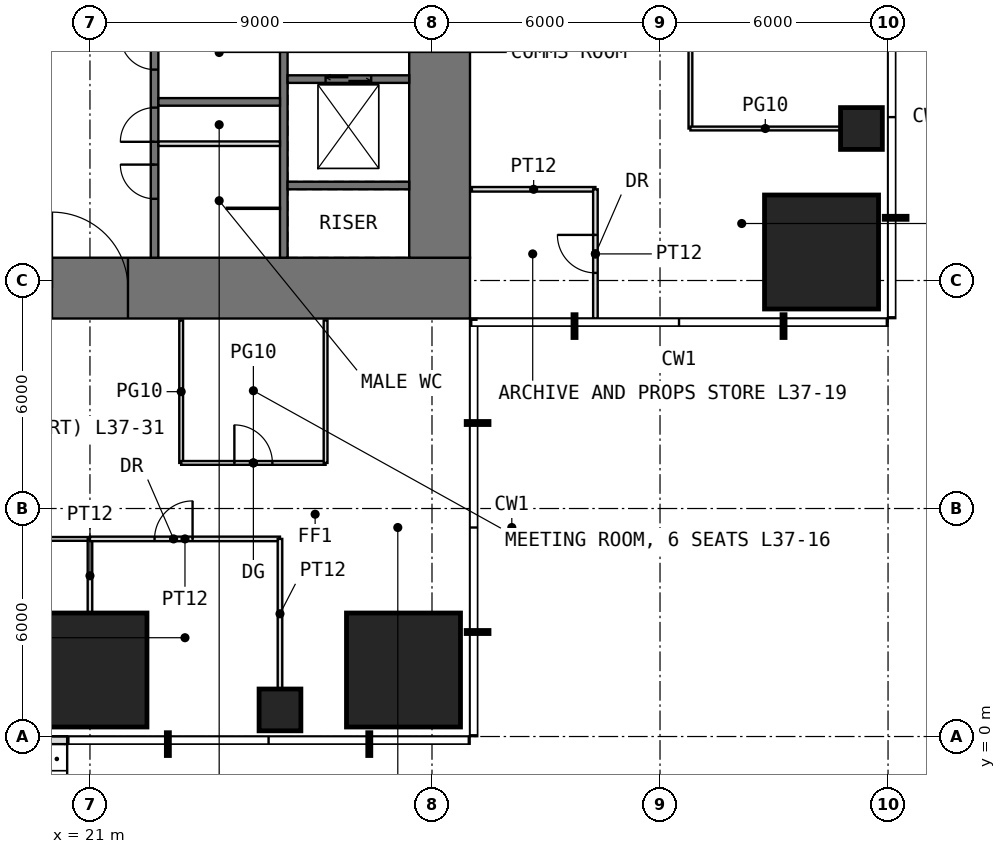
"""IFC4 building model, lengths in metres.
Left out: names, types, materials, properties, quantities, classifications, styles, units other than length and angle.
Written with IfcOpenShell. Run it as: python <this file> out.ifc"""

import sys

from ifc_helpers import new_model, si_unit, direction, frame, frame_2d, origin, origin_2d, place, context, subcontext, project, spatial, rectangle, extrude, element, fill, save


model = new_model("IFC4")
c1 = context("Model", 3, precision=1e-05, world=origin(), true_north=direction((0.0, 1.0)))
c2 = subcontext(c1, "Body", "Model", "MODEL_VIEW")
j1 = project(units=[si_unit("LENGTHUNIT", "METRE"), si_unit("PLANEANGLEUNIT", "RADIAN")], contexts=[c1])
p1 = place(None, origin())
s1 = spatial("IfcSite", under=j1, at=p1, CompositionType="ELEMENT")
p2 = place(p1, origin())
s2 = spatial("IfcBuilding", under=s1, at=p2, CompositionType="ELEMENT")
p3 = place(p2, frame((0.0, 0.0, 156.5)))
s3 = spatial("IfcBuildingStorey", under=s2, at=p3, CompositionType="ELEMENT", Elevation=156.5)
p4 = place(p3, frame((21.0, 1.75, 0.0), z_axis=(0.0, 0.0, 1.0), x_axis=(1.0, 0.0, 0.0)))
e1 = element("IfcColumn", 1, at=p4, inside=s3, PredefinedType="COLUMN", context=c2, shape_type="SweptSolid", body=[
    extrude(rectangle(XDim=3.0, YDim=3.0, at=origin_2d()), origin(), (0.0, 0.0, 1.0), 4.0),
])
p5 = place(p3, frame((26.0, 0.7, 0.0), z_axis=(0.0, 0.0, 1.0), x_axis=(1.0, 0.0, 0.0)))
e2 = element("IfcColumn", 2, at=p5, inside=s3, PredefinedType="COLUMN", context=c2, shape_type="SweptSolid", body=[
    extrude(rectangle(XDim=1.1, YDim=1.1, at=origin_2d()), origin(), (0.0, 0.0, 1.0), 4.0),
])
for number, where, z_axis, x_axis in (
    (3, (29.25, 1.75, 0.0), (0.0, 0.0, 1.0), (1.0, 0.0, 0.0)),
    (4, (40.25, 12.75, 0.0), (0.0, 0.0, 1.0), (1.0, 0.0, 0.0)),
):
    element("IfcColumn", number, at=place(p3, frame(where, z_axis=z_axis, x_axis=x_axis)), inside=s3, PredefinedType="COLUMN", context=c2, shape_type="SweptSolid", body=[
        extrude(rectangle(XDim=3.0, YDim=3.0, at=origin_2d()), origin(), (0.0, 0.0, 1.0), 4.0),
    ])
p6 = place(p3, frame((41.3, 16.0, 0.0), z_axis=(0.0, 0.0, 1.0), x_axis=(1.0, 0.0, 0.0)))
e5 = element("IfcColumn", 5, at=p6, inside=s3, PredefinedType="COLUMN", context=c2, shape_type="SweptSolid", body=[
    extrude(rectangle(XDim=1.1, YDim=1.1, at=origin_2d()), origin(), (0.0, 0.0, 1.0), 4.0),
])
p7 = place(p3, frame((16.6, -0.1, 0.0), z_axis=(0.0, 0.0, 1.0), x_axis=(1.0, 0.0, 0.0)))
e6 = element("IfcWall", 6, at=p7, inside=s3, PredefinedType="USERDEFINED", context=c2, shape_type="SweptSolid", body=[
    extrude(rectangle(XDim=3.8, YDim=0.2, at=frame_2d((1.9, 0.0))), origin(), (0.0, 0.0, 1.0), 3.55),
])
p8 = place(p7, frame((0.3, 0.0, 0.0)))
e7 = element("IfcOpeningElement", 7, at=p8, cuts=e6, PredefinedType="OPENING", context=c2, shape_type="SweptSolid", body=[
    extrude(rectangle(XDim=1.0, YDim=2.4, at=frame_2d((0.5, 1.2))), frame((0.0, 0.11, 0.0), z_axis=(0.0, -1.0, 0.0), x_axis=(1.0, 0.0, 0.0)), (0.0, 0.0, 1.0), 0.22),
])
p9 = place(p7, frame((1.6, 0.0, 0.3)))
e8 = element("IfcOpeningElement", 8, at=p9, cuts=e6, PredefinedType="OPENING", context=c2, shape_type="SweptSolid", body=[
    extrude(rectangle(XDim=1.4, YDim=2.7, at=frame_2d((0.7, 1.35))), frame((0.0, 0.11, 0.0), z_axis=(0.0, -1.0, 0.0), x_axis=(1.0, 0.0, 0.0)), (0.0, 0.0, 1.0), 0.22),
])
p10 = place(p3, frame((11.0, 11.8, -0.05), z_axis=(0.0, 0.0, 1.0), x_axis=(1.0, 0.0, 0.0)))
e9 = element("IfcWall", 9, at=p10, inside=s3, PredefinedType="SHEAR", context=c2, shape_type="SweptSolid", body=[
    extrude(rectangle(XDim=20.0, YDim=1.6, at=frame_2d((10.0, 0.0))), origin(), (0.0, 0.0, 1.0), 3.8),
])
p11 = place(p10, frame((9.0, 0.0, 0.05)))
e10 = element("IfcOpeningElement", 10, at=p11, cuts=e9, PredefinedType="OPENING", context=c2, shape_type="SweptSolid", body=[
    extrude(rectangle(XDim=2.0, YDim=2.2, at=frame_2d((1.0, 1.1))), frame((0.0, 0.81, 0.0), z_axis=(0.0, -1.0, 0.0), x_axis=(1.0, 0.0, 0.0)), (0.0, 0.0, 1.0), 1.62),
])
p12 = place(p3, frame((30.2, 12.6, -0.05), z_axis=(0.0, 0.0, 1.0), x_axis=(0.0, 1.0, 0.0)))
e11 = element("IfcWall", 11, at=p12, inside=s3, PredefinedType="SHEAR", context=c2, shape_type="SweptSolid", body=[
    extrude(rectangle(XDim=16.8, YDim=1.6, at=frame_2d((8.4, 0.0))), origin(), (0.0, 0.0, 1.0), 3.8),
])
p13 = place(p12, frame((5.9, 0.0, 0.05)))
e12 = element("IfcOpeningElement", 12, at=p13, cuts=e11, PredefinedType="OPENING", context=c2, shape_type="SweptSolid", body=[
    extrude(rectangle(XDim=1.0, YDim=2.2, at=frame_2d((0.5, 1.1))), frame((0.0, 0.81, 0.0), z_axis=(0.0, -1.0, 0.0), x_axis=(1.0, 0.0, 0.0)), (0.0, 0.0, 1.0), 1.62),
])
p14 = place(p3, frame((22.7, 12.6, -0.05), z_axis=(0.0, 0.0, 1.0), x_axis=(0.0, 1.0, 0.0)))
e13 = element("IfcWall", 13, at=p14, inside=s3, PredefinedType="SHEAR", context=c2, shape_type="SweptSolid", body=[
    extrude(rectangle(XDim=16.8, YDim=0.2, at=frame_2d((8.4, 0.0))), origin(), (0.0, 0.0, 1.0), 3.8),
])
p15 = place(p14, frame((3.05, 0.0, 0.05)))
e14 = element("IfcOpeningElement", 14, at=p15, cuts=e13, PredefinedType="OPENING", context=c2, shape_type="SweptSolid", body=[
    extrude(rectangle(XDim=0.9, YDim=2.2, at=frame_2d((0.45, 1.1))), frame((0.0, 0.11, 0.0), z_axis=(0.0, -1.0, 0.0), x_axis=(1.0, 0.0, 0.0)), (0.0, 0.0, 1.0), 0.22),
])
p16 = place(p14, frame((7.1, 0.0, 0.05)))
e15 = element("IfcOpeningElement", 15, at=p16, cuts=e13, PredefinedType="OPENING", context=c2, shape_type="SweptSolid", body=[
    extrude(rectangle(XDim=1.0, YDim=2.2, at=frame_2d((0.5, 1.1))), frame((0.0, 0.11, 0.0), z_axis=(0.0, -1.0, 0.0), x_axis=(1.0, 0.0, 0.0)), (0.0, 0.0, 1.0), 0.22),
])
p17 = place(p14, frame((1.55, 0.0, 0.05)))
e16 = element("IfcOpeningElement", 16, at=p17, cuts=e13, PredefinedType="OPENING", context=c2, shape_type="SweptSolid", body=[
    extrude(rectangle(XDim=0.9, YDim=2.2, at=frame_2d((0.45, 1.1))), frame((0.0, 0.11, 0.0), z_axis=(0.0, -1.0, 0.0), x_axis=(1.0, 0.0, 0.0)), (0.0, 0.0, 1.0), 0.22),
])
p18 = place(p14, frame((4.95, 0.0, 0.05)))
e17 = element("IfcOpeningElement", 17, at=p18, cuts=e13, PredefinedType="OPENING", context=c2, shape_type="SweptSolid", body=[
    extrude(rectangle(XDim=0.9, YDim=2.2, at=frame_2d((0.45, 1.1))), frame((0.0, 0.11, 0.0), z_axis=(0.0, -1.0, 0.0), x_axis=(1.0, 0.0, 0.0)), (0.0, 0.0, 1.0), 0.22),
])
p19 = place(p14, frame((9.4, 0.0, 0.05)))
e18 = element("IfcOpeningElement", 18, at=p19, cuts=e13, PredefinedType="OPENING", context=c2, shape_type="SweptSolid", body=[
    extrude(rectangle(XDim=1.0, YDim=2.2, at=frame_2d((0.5, 1.1))), frame((0.0, 0.11, 0.0), z_axis=(0.0, -1.0, 0.0), x_axis=(1.0, 0.0, 0.0)), (0.0, 0.0, 1.0), 0.22),
])
p20 = place(p3, frame((26.1, 12.6, -0.05), z_axis=(0.0, 0.0, 1.0), x_axis=(0.0, 1.0, 0.0)))
e19 = element("IfcWall", 19, at=p20, inside=s3, PredefinedType="SHEAR", context=c2, shape_type="SweptSolid", body=[
    extrude(rectangle(XDim=16.8, YDim=0.2, at=frame_2d((8.4, 0.0))), origin(), (0.0, 0.0, 1.0), 3.8),
])
p21 = place(p20, frame((6.9, 0.0, 0.05)))
e20 = element("IfcOpeningElement", 20, at=p21, cuts=e19, PredefinedType="OPENING", context=c2, shape_type="SweptSolid", body=[
    extrude(rectangle(XDim=1.0, YDim=2.2, at=frame_2d((0.5, 1.1))), frame((0.0, 0.11, 0.0), z_axis=(0.0, -1.0, 0.0), x_axis=(1.0, 0.0, 0.0)), (0.0, 0.0, 1.0), 0.22),
])
for number, where, z_axis, x_axis in (
    (21, (22.8, 16.7, -0.05), (0.0, 0.0, 1.0), (1.0, 0.0, 0.0)),
    (22, (26.2, 14.5, -0.05), (0.0, 0.0, 1.0), (1.0, 0.0, 0.0)),
):
    element("IfcWall", number, at=place(p3, frame(where, z_axis=z_axis, x_axis=x_axis)), inside=s3, PredefinedType="SHEAR", context=c2, shape_type="SweptSolid", body=[
        extrude(rectangle(XDim=3.2, YDim=0.2, at=frame_2d((1.6, 0.0))), origin(), (0.0, 0.0, 1.0), 3.8),
    ])
p22 = place(p3, frame((26.2, 17.3, -0.05), z_axis=(0.0, 0.0, 1.0), x_axis=(1.0, 0.0, 0.0)))
e23 = element("IfcWall", 23, at=p22, inside=s3, PredefinedType="SHEAR", context=c2, shape_type="SweptSolid", body=[
    extrude(rectangle(XDim=3.2, YDim=0.2, at=frame_2d((1.6, 0.0))), origin(), (0.0, 0.0, 1.0), 3.8),
])
p23 = place(p22, frame((1.0, 0.0, 0.05)))
e24 = element("IfcOpeningElement", 24, at=p23, cuts=e23, PredefinedType="OPENING", context=c2, shape_type="SweptSolid", body=[
    extrude(rectangle(XDim=1.2, YDim=2.2, at=frame_2d((0.6, 1.1))), frame((0.0, 0.11, 0.0), z_axis=(0.0, -1.0, 0.0), x_axis=(1.0, 0.0, 0.0)), (0.0, 0.0, 1.0), 0.22),
])
p24 = place(p3, frame((22.8, 15.6, 0.0), z_axis=(0.0, 0.0, 1.0), x_axis=(1.0, 0.0, 0.0)))
e25 = element("IfcWall", 25, at=p24, inside=s3, PredefinedType="PARTITIONING", context=c2, shape_type="SweptSolid", body=[
    extrude(rectangle(XDim=3.2, YDim=0.12, at=frame_2d((1.6, 0.0))), origin(), (0.0, 0.0, 1.0), 3.55),
])
p25 = place(p3, frame((24.6, 13.9, 0.0), z_axis=(0.0, 0.0, 1.0), x_axis=(1.0, 0.0, 0.0)))
e26 = element("IfcWall", 26, at=p25, inside=s3, PredefinedType="PARTITIONING", context=c2, shape_type="SweptSolid", body=[
    extrude(rectangle(XDim=1.4, YDim=0.03, at=frame_2d((0.7, 0.0))), origin(), (0.0, 0.0, 1.0), 3.55),
])
p26 = place(p3, frame((16.0, 5.2, 0.0), z_axis=(0.0, 0.0, 1.0), x_axis=(1.0, 0.0, 0.0)))
e27 = element("IfcWall", 27, at=p26, inside=s3, PredefinedType="PARTITIONING", context=c2, shape_type="SweptSolid", body=[
    extrude(rectangle(XDim=5.0, YDim=0.1, at=frame_2d((2.5, 0.0))), origin(), (0.0, 0.0, 1.0), 3.55),
])
p27 = place(p26, frame((2.0, 0.0, 0.0)))
e28 = element("IfcOpeningElement", 28, at=p27, cuts=e27, PredefinedType="OPENING", context=c2, shape_type="SweptSolid", body=[
    extrude(rectangle(XDim=1.0, YDim=2.4, at=frame_2d((0.5, 1.2))), frame((0.0, 0.06, 0.0), z_axis=(0.0, -1.0, 0.0), x_axis=(1.0, 0.0, 0.0)), (0.0, 0.0, 1.0), 0.12),
])
p28 = place(p3, frame((21.0, 3.26, 0.0), z_axis=(0.0, 0.0, 1.0), x_axis=(0.0, 1.0, 0.0)))
e29 = element("IfcWall", 29, at=p28, inside=s3, PredefinedType="PARTITIONING", context=c2, shape_type="SweptSolid", body=[
    extrude(rectangle(XDim=1.94, YDim=0.12, at=frame_2d((0.97, 0.0))), origin(), (0.0, 0.0, 1.0), 3.55),
])
p29 = place(p3, frame((21.0, 5.2, 0.0), z_axis=(0.0, 0.0, 1.0), x_axis=(1.0, 0.0, 0.0)))
e30 = element("IfcWall", 30, at=p29, inside=s3, PredefinedType="PARTITIONING", context=c2, shape_type="SweptSolid", body=[
    extrude(rectangle(XDim=5.0, YDim=0.12, at=frame_2d((2.5, 0.0))), origin(), (0.0, 0.0, 1.0), 3.55),
])
p30 = place(p29, frame((1.7, 0.0, 0.0)))
e31 = element("IfcOpeningElement", 31, at=p30, cuts=e30, PredefinedType="OPENING", context=c2, shape_type="SweptSolid", body=[
    extrude(rectangle(XDim=1.0, YDim=2.2, at=frame_2d((0.5, 1.1))), frame((0.0, 0.07, 0.0), z_axis=(0.0, -1.0, 0.0), x_axis=(1.0, 0.0, 0.0)), (0.0, 0.0, 1.0), 0.14),
])
p31 = place(p3, frame((23.4, 7.2, 0.0), z_axis=(0.0, 0.0, 1.0), x_axis=(0.0, 1.0, 0.0)))
e32 = element("IfcWall", 32, at=p31, inside=s3, PredefinedType="PARTITIONING", context=c2, shape_type="SweptSolid", body=[
    extrude(rectangle(XDim=3.75, YDim=0.1, at=frame_2d((1.875, 0.0))), origin(), (0.0, 0.0, 1.0), 3.55),
])
p32 = place(p3, frame((23.4, 7.2, 0.0), z_axis=(0.0, 0.0, 1.0), x_axis=(1.0, 0.0, 0.0)))
e33 = element("IfcWall", 33, at=p32, inside=s3, PredefinedType="PARTITIONING", context=c2, shape_type="SweptSolid", body=[
    extrude(rectangle(XDim=3.8, YDim=0.1, at=frame_2d((1.9, 0.0))), origin(), (0.0, 0.0, 1.0), 3.55),
])
p33 = place(p32, frame((1.4, 0.0, 0.0)))
e34 = element("IfcOpeningElement", 34, at=p33, cuts=e33, PredefinedType="OPENING", context=c2, shape_type="SweptSolid", body=[
    extrude(rectangle(XDim=1.0, YDim=2.4, at=frame_2d((0.5, 1.2))), frame((0.0, 0.06, 0.0), z_axis=(0.0, -1.0, 0.0), x_axis=(1.0, 0.0, 0.0)), (0.0, 0.0, 1.0), 0.12),
])
p34 = place(p3, frame((26.0, 1.26, 0.0), z_axis=(0.0, 0.0, 1.0), x_axis=(0.0, 1.0, 0.0)))
e35 = element("IfcWall", 35, at=p34, inside=s3, PredefinedType="PARTITIONING", context=c2, shape_type="SweptSolid", body=[
    extrude(rectangle(XDim=3.94, YDim=0.12, at=frame_2d((1.97, 0.0))), origin(), (0.0, 0.0, 1.0), 2.736),
])
p35 = place(p3, frame((27.2, 7.2, 0.0), z_axis=(0.0, 0.0, 1.0), x_axis=(0.0, 1.0, 0.0)))
e36 = element("IfcWall", 36, at=p35, inside=s3, PredefinedType="PARTITIONING", context=c2, shape_type="SweptSolid", body=[
    extrude(rectangle(XDim=3.75, YDim=0.1, at=frame_2d((1.875, 0.0))), origin(), (0.0, 0.0, 1.0), 3.55),
])
p36 = place(p3, frame((31.05, 14.4, 0.0), z_axis=(0.0, 0.0, 1.0), x_axis=(1.0, 0.0, 0.0)))
e37 = element("IfcWall", 37, at=p36, inside=s3, PredefinedType="PARTITIONING", context=c2, shape_type="SweptSolid", body=[
    extrude(rectangle(XDim=3.25, YDim=0.12, at=frame_2d((1.625, 0.0))), origin(), (0.0, 0.0, 1.0), 3.55),
])
p37 = place(p3, frame((34.3, 11.0, 0.0), z_axis=(0.0, 0.0, 1.0), x_axis=(0.0, 1.0, 0.0)))
e38 = element("IfcWall", 38, at=p37, inside=s3, PredefinedType="PARTITIONING", context=c2, shape_type="SweptSolid", body=[
    extrude(rectangle(XDim=3.4, YDim=0.12, at=frame_2d((1.7, 0.0))), origin(), (0.0, 0.0, 1.0), 3.55),
])
p38 = place(p37, frame((1.2, 0.0, 0.0)))
e39 = element("IfcOpeningElement", 39, at=p38, cuts=e38, PredefinedType="OPENING", context=c2, shape_type="SweptSolid", body=[
    extrude(rectangle(XDim=1.0, YDim=2.2, at=frame_2d((0.5, 1.1))), frame((0.0, 0.07, 0.0), z_axis=(0.0, -1.0, 0.0), x_axis=(1.0, 0.0, 0.0)), (0.0, 0.0, 1.0), 0.14),
])
p39 = place(p3, frame((36.8, 16.0, 0.0), z_axis=(0.0, 0.0, 1.0), x_axis=(0.0, 1.0, 0.0)))
e40 = element("IfcWall", 40, at=p39, inside=s3, PredefinedType="PARTITIONING", context=c2, shape_type="SweptSolid", body=[
    extrude(rectangle(XDim=10.0, YDim=0.1, at=frame_2d((5.0, 0.0))), origin(), (0.0, 0.0, 1.0), 3.55),
])
p40 = place(p39, frame((4.1, 0.0, 0.0)))
e41 = element("IfcOpeningElement", 41, at=p40, cuts=e40, PredefinedType="OPENING", context=c2, shape_type="SweptSolid", body=[
    extrude(rectangle(XDim=1.8, YDim=2.4, at=frame_2d((0.9, 1.2))), frame((0.0, 0.06, 0.0), z_axis=(0.0, -1.0, 0.0), x_axis=(1.0, 0.0, 0.0)), (0.0, 0.0, 1.0), 0.12),
])
p41 = place(p3, frame((36.8, 16.0, 0.0), z_axis=(0.0, 0.0, 1.0), x_axis=(1.0, 0.0, 0.0)))
e42 = element("IfcWall", 42, at=p41, inside=s3, PredefinedType="PARTITIONING", context=c2, shape_type="SweptSolid", body=[
    extrude(rectangle(XDim=3.94, YDim=0.1, at=frame_2d((1.97, 0.0))), origin(), (0.0, 0.0, 1.0), 2.736),
])
p42 = place(p11, origin())
e43 = element("IfcDoor", 43, at=p42, inside=s3, OperationType="DOUBLE_DOOR_SINGLE_SWING", PredefinedType="DOOR", context=c2, shape_type="SweptSolid", body=[
    extrude(rectangle(XDim=2.0, YDim=2.2, at=frame_2d((1.0, 1.1))), frame((0.0, 0.025, 0.0), z_axis=(0.0, -1.0, 0.0), x_axis=(1.0, 0.0, 0.0)), (0.0, 0.0, 1.0), 0.05),
])
fill(e10, e43)
p43 = place(p15, origin())
e44 = element("IfcDoor", 44, at=p43, inside=s3, OperationType="SINGLE_SWING_LEFT", PredefinedType="DOOR", context=c2, shape_type="SweptSolid", body=[
    extrude(rectangle(XDim=0.9, YDim=2.2, at=frame_2d((0.45, 1.1))), frame((0.0, 0.025, 0.0), z_axis=(0.0, -1.0, 0.0), x_axis=(1.0, 0.0, 0.0)), (0.0, 0.0, 1.0), 0.05),
])
fill(e14, e44)
p44 = place(p17, origin())
e45 = element("IfcDoor", 45, at=p44, inside=s3, OperationType="SINGLE_SWING_RIGHT", PredefinedType="DOOR", context=c2, shape_type="SweptSolid", body=[
    extrude(rectangle(XDim=0.9, YDim=2.2, at=frame_2d((0.45, 1.1))), frame((0.0, 0.025, 0.0), z_axis=(0.0, -1.0, 0.0), x_axis=(1.0, 0.0, 0.0)), (0.0, 0.0, 1.0), 0.05),
])
fill(e16, e45)
p45 = place(p18, origin())
e46 = element("IfcDoor", 46, at=p45, inside=s3, OperationType="SINGLE_SWING_RIGHT", PredefinedType="DOOR", context=c2, shape_type="SweptSolid", body=[
    extrude(rectangle(XDim=0.9, YDim=2.2, at=frame_2d((0.45, 1.1))), frame((0.0, 0.025, 0.0), z_axis=(0.0, -1.0, 0.0), x_axis=(1.0, 0.0, 0.0)), (0.0, 0.0, 1.0), 0.05),
])
fill(e17, e46)
p46 = place(p33, origin())
e47 = element("IfcDoor", 47, at=p46, inside=s3, OperationType="SINGLE_SWING_LEFT", PredefinedType="DOOR", context=c2, shape_type="SweptSolid", body=[
    extrude(rectangle(XDim=1.0, YDim=2.4, at=frame_2d((0.5, 1.2))), frame((0.0, 0.025, 0.0), z_axis=(0.0, -1.0, 0.0), x_axis=(1.0, 0.0, 0.0)), (0.0, 0.0, 1.0), 0.05),
])
fill(e34, e47)
p47 = place(p30, origin())
e48 = element("IfcDoor", 48, at=p47, inside=s3, OperationType="SINGLE_SWING_RIGHT", PredefinedType="DOOR", context=c2, shape_type="SweptSolid", body=[
    extrude(rectangle(XDim=1.0, YDim=2.2, at=frame_2d((0.5, 1.1))), frame((0.0, 0.025, 0.0), z_axis=(0.0, -1.0, 0.0), x_axis=(1.0, 0.0, 0.0)), (0.0, 0.0, 1.0), 0.05),
])
fill(e31, e48)
p48 = place(p38, origin())
e49 = element("IfcDoor", 49, at=p48, inside=s3, OperationType="SINGLE_SWING_RIGHT", PredefinedType="DOOR", context=c2, shape_type="SweptSolid", body=[
    extrude(rectangle(XDim=1.0, YDim=2.2, at=frame_2d((0.5, 1.1))), frame((0.0, 0.025, 0.0), z_axis=(0.0, -1.0, 0.0), x_axis=(1.0, 0.0, 0.0)), (0.0, 0.0, 1.0), 0.05),
])
fill(e39, e49)
p49 = place(p23, origin())
e50 = element("IfcDoor", 50, at=p49, inside=s3, OperationType="DOUBLE_DOOR_SLIDING", PredefinedType="DOOR", context=c2, shape_type="SweptSolid", body=[
    extrude(rectangle(XDim=1.2, YDim=2.2, at=frame_2d((0.6, 1.1))), frame((0.0, 0.025, 0.0), z_axis=(0.0, -1.0, 0.0), x_axis=(1.0, 0.0, 0.0)), (0.0, 0.0, 1.0), 0.05),
])
fill(e24, e50)
save(model, sys.argv[1])
